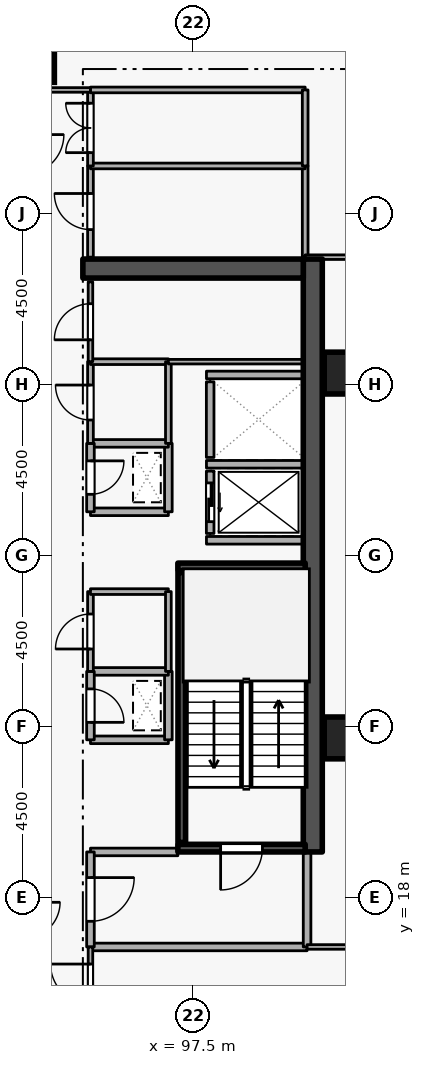
"""IFC4 building model, lengths in metres.
Left out: names, types, materials, properties, quantities, classifications, styles, units other than length and angle.
Written with IfcOpenShell. Run it as: python <this file> out.ifc"""

import sys

from ifc_helpers import new_model, si_unit, direction, frame, frame_2d, origin, origin_2d, place, context, subcontext, project, spatial, rectangle, extrude, element, fill, save


model = new_model("IFC4")
c1 = context("Model", 3, precision=1e-05, world=origin(), true_north=direction((0.0, 1.0)))
c2 = subcontext(c1, "Body", "Model", "MODEL_VIEW")
j1 = project(units=[si_unit("LENGTHUNIT", "METRE"), si_unit("PLANEANGLEUNIT", "RADIAN")], contexts=[c1])
p1 = place(None, origin())
s1 = spatial("IfcSite", under=j1, at=p1, CompositionType="ELEMENT")
p2 = place(p1, origin())
s2 = spatial("IfcBuilding", under=s1, at=p2, CompositionType="ELEMENT")
p3 = place(p2, frame((0.0, 0.0, 170.7)))
s3 = spatial("IfcBuildingStorey", under=s2, at=p3, CompositionType="ELEMENT", Elevation=170.7)
p4 = place(p3, frame((100.65, 19.2, 0.0), z_axis=(0.0, 0.0, 1.0), x_axis=(0.0, 1.0, 0.0)))
e1 = element("IfcWall", 1, at=p4, inside=s3, PredefinedType="SHEAR", context=c2, shape_type="SweptSolid", body=[
    extrude(rectangle(XDim=15.6, YDim=0.5, at=frame_2d((7.8, 0.0))), origin(), (0.0, 0.0, 1.0), 3.6),
])
p5 = place(p3, frame((94.6, 34.55, 0.0), z_axis=(0.0, 0.0, 1.0), x_axis=(1.0, 0.0, 0.0)))
e2 = element("IfcWall", 2, at=p5, inside=s3, PredefinedType="SHEAR", context=c2, shape_type="SweptSolid", body=[
    extrude(rectangle(XDim=5.8, YDim=0.5, at=frame_2d((2.9, 0.0))), origin(), (0.0, 0.0, 1.0), 3.6),
])
for number, where, z_axis, x_axis in (
    (3, (93.3, 40.0, 0.0), (0.0, 0.0, 1.0), (1.0, 0.0, 0.0)),
    (4, (101.5, 22.2, 0.0), (0.0, 0.0, 1.0), (1.0, 0.0, 0.0)),
    (5, (101.5, 31.8, 0.0), (0.0, 0.0, 1.0), (1.0, 0.0, 0.0)),
):
    element("IfcColumn", number, at=place(p3, frame(where, z_axis=z_axis, x_axis=x_axis)), inside=s3, PredefinedType="COLUMN", context=c2, shape_type="SweptSolid", body=[
        extrude(rectangle(XDim=1.1, YDim=1.1, at=origin_2d()), origin(), (0.0, 0.0, 1.0), 3.6),
    ])
p6 = place(p3, frame((97.95, 29.22, 0.0), z_axis=(0.0, 0.0, 1.0), x_axis=(0.0, -1.0, 0.0)))
e6 = element("IfcWall", 6, at=p6, inside=s3, PredefinedType="STANDARD", context=c2, shape_type="SweptSolid", body=[
    extrude(rectangle(XDim=1.64, YDim=0.2, at=frame_2d((0.82, 0.0))), origin(), (0.0, 0.0, 1.0), 3.26),
])
p7 = place(p6, frame((0.31, 0.0, 0.0)))
e7 = element("IfcOpeningElement", 7, at=p7, cuts=e6, PredefinedType="OPENING", context=c2, shape_type="SweptSolid", body=[
    extrude(rectangle(XDim=1.02, YDim=2.06, at=frame_2d((0.51, 1.03))), frame((0.0, 0.11, 0.0), z_axis=(0.0, -1.0, 0.0), x_axis=(1.0, 0.0, 0.0)), (0.0, 0.0, 1.0), 0.22),
])
p8 = place(p3, frame((97.95, 31.57, 0.0), z_axis=(0.0, 0.0, 1.0), x_axis=(0.0, -1.0, 0.0)))
e8 = element("IfcWall", 8, at=p8, inside=s3, PredefinedType="STANDARD", context=c2, shape_type="SweptSolid", body=[
    extrude(rectangle(XDim=1.99, YDim=0.2, at=frame_2d((0.995, 0.0))), origin(), (0.0, 0.0, 1.0), 3.26),
])
for number, where, z_axis, x_axis in (
    (9, (97.852, 29.4, 0.0), (0.0, 0.0, 1.0), (1.0, 0.0, 0.0)),
    (10, (97.852, 27.4, 0.0), (0.0, 0.0, 1.0), (1.0, 0.0, 0.0)),
    (11, (97.852, 31.75, 0.0), (0.0, 0.0, 1.0), (1.0, 0.0, 0.0)),
):
    element("IfcWall", number, at=place(p3, frame(where, z_axis=z_axis, x_axis=x_axis)), inside=s3, PredefinedType="STANDARD", context=c2, shape_type="SweptSolid", body=[
        extrude(rectangle(XDim=2.536, YDim=0.2, at=frame_2d((1.268, 0.0))), origin(), (0.0, 0.0, 1.0), 3.26),
    ])
p9 = place(p3, frame((100.45, 19.3, 0.0), z_axis=(0.0, 0.0, 1.0), x_axis=(-1.0, 0.0, 0.0)))
e12 = element("IfcWall", 12, at=p9, inside=s3, PredefinedType="SHEAR", context=c2, shape_type="SweptSolid", body=[
    extrude(rectangle(XDim=3.35, YDim=0.2, at=frame_2d((1.675, 0.0))), origin(), (0.0, 0.0, 1.0), 3.6),
])
p10 = place(p9, frame((1.125, 0.0, 0.0)))
e13 = element("IfcOpeningElement", 13, at=p10, cuts=e12, PredefinedType="OPENING", context=c2, shape_type="SweptSolid", body=[
    extrude(rectangle(XDim=1.1, YDim=2.1, at=frame_2d((0.55, 1.05))), frame((0.0, 0.11, 0.0), z_axis=(0.0, -1.0, 0.0), x_axis=(1.0, 0.0, 0.0)), (0.0, 0.0, 1.0), 0.22),
])
p11 = place(p3, frame((97.1, 26.7, 0.0), z_axis=(0.0, 0.0, 1.0), x_axis=(1.0, 0.0, 0.0)))
e14 = element("IfcWall", 14, at=p11, inside=s3, PredefinedType="SHEAR", context=c2, shape_type="SweptSolid", body=[
    extrude(rectangle(XDim=3.35, YDim=0.2, at=frame_2d((1.675, 0.0))), origin(), (0.0, 0.0, 1.0), 3.6),
])
p12 = place(p3, frame((97.203, 26.55, 0.0), z_axis=(0.0, 0.0, 1.0), x_axis=(0.0, -1.0, 0.0)))
e15 = element("IfcWall", 15, at=p12, inside=s3, PredefinedType="SHEAR", context=c2, shape_type="SweptSolid", body=[
    extrude(rectangle(XDim=7.1, YDim=0.2, at=frame_2d((3.55, 0.0))), origin(), (0.0, 0.0, 1.0), 3.6),
])
p13 = place(p3, frame((94.8, 16.7, 0.0), z_axis=(0.0, 0.0, 1.0), x_axis=(1.0, 0.0, 0.0)))
e16 = element("IfcWall", 16, at=p13, inside=s3, PredefinedType="STANDARD", context=c2, shape_type="SweptSolid", body=[
    extrude(rectangle(XDim=5.7, YDim=0.2, at=frame_2d((2.85, 0.0))), origin(), (0.0, 0.0, 1.0), 3.26),
])
p14 = place(p3, frame((100.5, 16.7, 0.0), z_axis=(0.0, 0.0, 1.0), x_axis=(0.0, 1.0, 0.0)))
e17 = element("IfcWall", 17, at=p14, inside=s3, PredefinedType="STANDARD", context=c2, shape_type="SweptSolid", body=[
    extrude(rectangle(XDim=2.5, YDim=0.2, at=frame_2d((1.25, 0.0))), origin(), (0.0, 0.0, 1.0), 3.26),
])
p15 = place(p3, frame((97.1, 19.2, 0.0), z_axis=(0.0, 0.0, 1.0), x_axis=(-1.0, 0.0, 0.0)))
e18 = element("IfcWall", 18, at=p15, inside=s3, PredefinedType="STANDARD", context=c2, shape_type="SweptSolid", body=[
    extrude(rectangle(XDim=2.3, YDim=0.2, at=frame_2d((1.15, 0.0))), origin(), (0.0, 0.0, 1.0), 2.465),
])
p16 = place(p3, frame((94.8, 19.2, 0.0), z_axis=(0.0, 0.0, 1.0), x_axis=(0.0, -1.0, 0.0)))
e19 = element("IfcWall", 19, at=p16, inside=s3, PredefinedType="STANDARD", context=c2, shape_type="SweptSolid", body=[
    extrude(rectangle(XDim=2.5, YDim=0.2, at=frame_2d((1.25, 0.0))), origin(), (0.0, 0.0, 1.0), 3.26),
])
p17 = place(p16, frame((0.675, 0.0, 0.0)))
e20 = element("IfcOpeningElement", 20, at=p17, cuts=e19, PredefinedType="OPENING", context=c2, shape_type="SweptSolid", body=[
    extrude(rectangle(XDim=1.15, YDim=2.1, at=frame_2d((0.575, 1.05))), frame((0.0, 0.11, 0.0), z_axis=(0.0, -1.0, 0.0), x_axis=(1.0, 0.0, 0.0)), (0.0, 0.0, 1.0), 0.22),
])
p18 = place(p3, frame((94.8, 28.15, 0.0), z_axis=(0.0, 0.0, 1.0), x_axis=(1.0, 0.0, 0.0)))
e21 = element("IfcWall", 21, at=p18, inside=s3, PredefinedType="STANDARD", context=c2, shape_type="SweptSolid", body=[
    extrude(rectangle(XDim=2.05, YDim=0.2, at=frame_2d((1.025, 0.0))), origin(), (0.0, 0.0, 1.0), 3.26),
])
p19 = place(p3, frame((96.85, 28.15, 0.0), z_axis=(0.0, 0.0, 1.0), x_axis=(0.0, 1.0, 0.0)))
e22 = element("IfcWall", 22, at=p19, inside=s3, PredefinedType="STANDARD", context=c2, shape_type="SweptSolid", body=[
    extrude(rectangle(XDim=1.8, YDim=0.2, at=frame_2d((0.9, 0.0))), origin(), (0.0, 0.0, 1.0), 3.26),
])
p20 = place(p3, frame((96.85, 29.95, 0.0), z_axis=(0.0, 0.0, 1.0), x_axis=(-1.0, 0.0, 0.0)))
e23 = element("IfcWall", 23, at=p20, inside=s3, PredefinedType="STANDARD", context=c2, shape_type="SweptSolid", body=[
    extrude(rectangle(XDim=2.05, YDim=0.2, at=frame_2d((1.025, 0.0))), origin(), (0.0, 0.0, 1.0), 3.26),
])
p21 = place(p3, frame((94.8, 29.95, 0.0), z_axis=(0.0, 0.0, 1.0), x_axis=(0.0, -1.0, 0.0)))
e24 = element("IfcWall", 24, at=p21, inside=s3, PredefinedType="STANDARD", context=c2, shape_type="SweptSolid", body=[
    extrude(rectangle(XDim=1.8, YDim=0.2, at=frame_2d((0.9, 0.0))), origin(), (0.0, 0.0, 1.0), 3.26),
])
p22 = place(p21, frame((0.46, 0.0, 0.0)))
e25 = element("IfcOpeningElement", 25, at=p22, cuts=e24, PredefinedType="OPENING", context=c2, shape_type="SweptSolid", body=[
    extrude(rectangle(XDim=0.88, YDim=2.04, at=frame_2d((0.44, 1.02))), frame((0.0, 0.11, 0.0), z_axis=(0.0, -1.0, 0.0), x_axis=(1.0, 0.0, 0.0)), (0.0, 0.0, 1.0), 0.22),
])
p23 = place(p3, frame((94.8, 22.15, 0.0), z_axis=(0.0, 0.0, 1.0), x_axis=(1.0, 0.0, 0.0)))
e26 = element("IfcWall", 26, at=p23, inside=s3, PredefinedType="STANDARD", context=c2, shape_type="SweptSolid", body=[
    extrude(rectangle(XDim=2.05, YDim=0.2, at=frame_2d((1.025, 0.0))), origin(), (0.0, 0.0, 1.0), 3.26),
])
p24 = place(p3, frame((96.85, 22.15, 0.0), z_axis=(0.0, 0.0, 1.0), x_axis=(0.0, 1.0, 0.0)))
e27 = element("IfcWall", 27, at=p24, inside=s3, PredefinedType="STANDARD", context=c2, shape_type="SweptSolid", body=[
    extrude(rectangle(XDim=1.8, YDim=0.2, at=frame_2d((0.9, 0.0))), origin(), (0.0, 0.0, 1.0), 3.26),
])
p25 = place(p3, frame((96.85, 23.95, 0.0), z_axis=(0.0, 0.0, 1.0), x_axis=(-1.0, 0.0, 0.0)))
e28 = element("IfcWall", 28, at=p25, inside=s3, PredefinedType="STANDARD", context=c2, shape_type="SweptSolid", body=[
    extrude(rectangle(XDim=2.05, YDim=0.2, at=frame_2d((1.025, 0.0))), origin(), (0.0, 0.0, 1.0), 3.26),
])
p26 = place(p3, frame((94.8, 23.95, 0.0), z_axis=(0.0, 0.0, 1.0), x_axis=(0.0, -1.0, 0.0)))
e29 = element("IfcWall", 29, at=p26, inside=s3, PredefinedType="STANDARD", context=c2, shape_type="SweptSolid", body=[
    extrude(rectangle(XDim=1.8, YDim=0.2, at=frame_2d((0.9, 0.0))), origin(), (0.0, 0.0, 1.0), 3.26),
])
p27 = place(p26, frame((0.46, 0.0, 0.0)))
e30 = element("IfcOpeningElement", 30, at=p27, cuts=e29, PredefinedType="OPENING", context=c2, shape_type="SweptSolid", body=[
    extrude(rectangle(XDim=0.88, YDim=2.04, at=frame_2d((0.44, 1.02))), frame((0.0, 0.11, 0.0), z_axis=(0.0, -1.0, 0.0), x_axis=(1.0, 0.0, 0.0)), (0.0, 0.0, 1.0), 0.22),
])
p28 = place(p3, frame((94.8, 23.95, 0.0), z_axis=(0.0, 0.0, 1.0), x_axis=(0.0, 1.0, 0.0)))
e31 = element("IfcWall", 31, at=p28, inside=s3, PredefinedType="PARTITIONING", context=c2, shape_type="SweptSolid", body=[
    extrude(rectangle(XDim=2.1, YDim=0.15, at=frame_2d((1.05, 0.0))), origin(), (0.0, 0.0, 1.0), 3.26),
])
p29 = place(p28, frame((0.59, 0.0, 0.0)))
e32 = element("IfcOpeningElement", 32, at=p29, cuts=e31, PredefinedType="OPENING", context=c2, shape_type="SweptSolid", body=[
    extrude(rectangle(XDim=0.92, YDim=2.08, at=frame_2d((0.46, 1.04))), frame((0.0, 0.085, 0.0), z_axis=(0.0, -1.0, 0.0), x_axis=(1.0, 0.0, 0.0)), (0.0, 0.0, 1.0), 0.17),
])
p30 = place(p3, frame((94.8, 26.05, 0.0), z_axis=(0.0, 0.0, 1.0), x_axis=(1.0, 0.0, 0.0)))
e33 = element("IfcWall", 33, at=p30, inside=s3, PredefinedType="PARTITIONING", context=c2, shape_type="SweptSolid", body=[
    extrude(rectangle(XDim=2.05, YDim=0.15, at=frame_2d((1.025, 0.0))), origin(), (0.0, 0.0, 1.0), 3.26),
])
p31 = place(p3, frame((96.85, 26.05, 0.0), z_axis=(0.0, 0.0, 1.0), x_axis=(0.0, -1.0, 0.0)))
e34 = element("IfcWall", 34, at=p31, inside=s3, PredefinedType="PARTITIONING", context=c2, shape_type="SweptSolid", body=[
    extrude(rectangle(XDim=2.1, YDim=0.15, at=frame_2d((1.05, 0.0))), origin(), (0.0, 0.0, 1.0), 3.26),
])
p32 = place(p3, frame((94.8, 29.95, 0.0), z_axis=(0.0, 0.0, 1.0), x_axis=(0.0, 1.0, 0.0)))
e35 = element("IfcWall", 35, at=p32, inside=s3, PredefinedType="PARTITIONING", context=c2, shape_type="SweptSolid", body=[
    extrude(rectangle(XDim=2.15, YDim=0.15, at=frame_2d((1.075, 0.0))), origin(), (0.0, 0.0, 1.0), 3.26),
])
p33 = place(p32, frame((0.615, 0.0, 0.0)))
e36 = element("IfcOpeningElement", 36, at=p33, cuts=e35, PredefinedType="OPENING", context=c2, shape_type="SweptSolid", body=[
    extrude(rectangle(XDim=0.92, YDim=2.08, at=frame_2d((0.46, 1.04))), frame((0.0, 0.085, 0.0), z_axis=(0.0, -1.0, 0.0), x_axis=(1.0, 0.0, 0.0)), (0.0, 0.0, 1.0), 0.17),
])
p34 = place(p3, frame((94.8, 32.1, 0.0), z_axis=(0.0, 0.0, 1.0), x_axis=(1.0, 0.0, 0.0)))
e37 = element("IfcWall", 37, at=p34, inside=s3, PredefinedType="PARTITIONING", context=c2, shape_type="SweptSolid", body=[
    extrude(rectangle(XDim=2.05, YDim=0.15, at=frame_2d((1.025, 0.0))), origin(), (0.0, 0.0, 1.0), 3.26),
])
p35 = place(p3, frame((96.85, 32.1, 0.0), z_axis=(0.0, 0.0, 1.0), x_axis=(0.0, -1.0, 0.0)))
e38 = element("IfcWall", 38, at=p35, inside=s3, PredefinedType="PARTITIONING", context=c2, shape_type="SweptSolid", body=[
    extrude(rectangle(XDim=2.15, YDim=0.15, at=frame_2d((1.075, 0.0))), origin(), (0.0, 0.0, 1.0), 3.26),
])
p36 = place(p3, frame((94.8, 32.1, 0.0), z_axis=(0.0, 0.0, 1.0), x_axis=(0.0, 1.0, 0.0)))
e39 = element("IfcWall", 39, at=p36, inside=s3, PredefinedType="PARTITIONING", context=c2, shape_type="SweptSolid", body=[
    extrude(rectangle(XDim=2.1, YDim=0.12, at=frame_2d((1.05, 0.0))), origin(), (0.0, 0.0, 1.0), 3.26),
])
p37 = place(p36, frame((0.575, 0.0, 0.0)))
e40 = element("IfcOpeningElement", 40, at=p37, cuts=e39, PredefinedType="OPENING", context=c2, shape_type="SweptSolid", body=[
    extrude(rectangle(XDim=0.95, YDim=2.1, at=frame_2d((0.475, 1.05))), frame((0.0, 0.07, 0.0), z_axis=(0.0, -1.0, 0.0), x_axis=(1.0, 0.0, 0.0)), (0.0, 0.0, 1.0), 0.14),
])
p38 = place(p3, frame((100.4, 32.1, 0.0), z_axis=(0.0, 0.0, 1.0), x_axis=(-1.0, 0.0, 0.0)))
e41 = element("IfcWall", 41, at=p38, inside=s3, PredefinedType="PARTITIONING", context=c2, shape_type="SweptSolid", body=[
    extrude(rectangle(XDim=3.55, YDim=0.12, at=frame_2d((1.775, 0.0))), origin(), (0.0, 0.0, 1.0), 3.26),
])
p39 = place(p3, frame((100.45, 37.25, 0.0), z_axis=(0.0, 0.0, 1.0), x_axis=(0.0, -1.0, 0.0)))
e42 = element("IfcWall", 42, at=p39, inside=s3, PredefinedType="PARTITIONING", context=c2, shape_type="SweptSolid", body=[
    extrude(rectangle(XDim=2.4, YDim=0.15, at=frame_2d((1.2, 0.0))), origin(), (0.0, 0.0, 1.0), 3.26),
])
p40 = place(p3, frame((94.8, 34.85, 0.0), z_axis=(0.0, 0.0, 1.0), x_axis=(0.0, 1.0, 0.0)))
e43 = element("IfcWall", 43, at=p40, inside=s3, PredefinedType="PARTITIONING", context=c2, shape_type="SweptSolid", body=[
    extrude(rectangle(XDim=2.4, YDim=0.15, at=frame_2d((1.2, 0.0))), origin(), (0.0, 0.0, 1.0), 3.26),
])
p41 = place(p40, frame((0.725, 0.0, 0.0)))
e44 = element("IfcOpeningElement", 44, at=p41, cuts=e43, PredefinedType="OPENING", context=c2, shape_type="SweptSolid", body=[
    extrude(rectangle(XDim=0.95, YDim=2.1, at=frame_2d((0.475, 1.05))), frame((0.0, 0.085, 0.0), z_axis=(0.0, -1.0, 0.0), x_axis=(1.0, 0.0, 0.0)), (0.0, 0.0, 1.0), 0.17),
])
p42 = place(p3, frame((94.8, 37.25, 0.0), z_axis=(0.0, 0.0, 1.0), x_axis=(1.0, 0.0, 0.0)))
e45 = element("IfcWall", 45, at=p42, inside=s3, PredefinedType="PARTITIONING", context=c2, shape_type="SweptSolid", body=[
    extrude(rectangle(XDim=5.65, YDim=0.15, at=frame_2d((2.825, 0.0))), origin(), (0.0, 0.0, 1.0), 3.26),
])
p43 = place(p3, frame((94.8, 37.25, 0.0), z_axis=(0.0, 0.0, 1.0), x_axis=(0.0, 1.0, 0.0)))
e46 = element("IfcWall", 46, at=p43, inside=s3, PredefinedType="PARTITIONING", context=c2, shape_type="SweptSolid", body=[
    extrude(rectangle(XDim=2.0, YDim=0.15, at=frame_2d((1.0, 0.0))), origin(), (0.0, 0.0, 1.0), 3.26),
])
p44 = place(p43, frame((0.35, 0.0, 0.0)))
e47 = element("IfcOpeningElement", 47, at=p44, cuts=e46, PredefinedType="OPENING", context=c2, shape_type="SweptSolid", body=[
    extrude(rectangle(XDim=1.3, YDim=2.12, at=frame_2d((0.65, 1.06))), frame((0.0, 0.085, 0.0), z_axis=(0.0, -1.0, 0.0), x_axis=(1.0, 0.0, 0.0)), (0.0, 0.0, 1.0), 0.17),
])
p45 = place(p3, frame((94.8, 39.25, 0.0), z_axis=(0.0, 0.0, 1.0), x_axis=(1.0, 0.0, 0.0)))
e48 = element("IfcWall", 48, at=p45, inside=s3, PredefinedType="PARTITIONING", context=c2, shape_type="SweptSolid", body=[
    extrude(rectangle(XDim=5.65, YDim=0.15, at=frame_2d((2.825, 0.0))), origin(), (0.0, 0.0, 1.0), 3.26),
])
p46 = place(p3, frame((100.45, 39.25, 0.0), z_axis=(0.0, 0.0, 1.0), x_axis=(0.0, -1.0, 0.0)))
e49 = element("IfcWall", 49, at=p46, inside=s3, PredefinedType="PARTITIONING", context=c2, shape_type="SweptSolid", body=[
    extrude(rectangle(XDim=2.0, YDim=0.15, at=frame_2d((1.0, 0.0))), origin(), (0.0, 0.0, 1.0), 3.26),
])
p47 = place(p3, frame((94.8, 14.75, 0.0), z_axis=(0.0, 0.0, 1.0), x_axis=(0.0, 1.0, 0.0)))
e50 = element("IfcWall", 50, at=p47, inside=s3, PredefinedType="PARTITIONING", context=c2, shape_type="SweptSolid", body=[
    extrude(rectangle(XDim=1.95, YDim=0.12, at=frame_2d((0.975, 0.0))), origin(), (0.0, 0.0, 1.0), 3.26),
])
p48 = place(p47, frame((0.45, 0.0, 0.0)))
e51 = element("IfcOpeningElement", 51, at=p48, cuts=e50, PredefinedType="OPENING", context=c2, shape_type="SweptSolid", body=[
    extrude(rectangle(XDim=1.05, YDim=2.1, at=frame_2d((0.525, 1.05))), frame((0.0, 0.07, 0.0), z_axis=(0.0, -1.0, 0.0), x_axis=(1.0, 0.0, 0.0)), (0.0, 0.0, 1.0), 0.14),
])
p49 = place(p3, frame((100.5, 16.7, 0.0), z_axis=(0.0, 0.0, 1.0), x_axis=(1.0, 0.0, 0.0)))
e52 = element("IfcWall", 52, at=p49, inside=s3, PredefinedType="PARTITIONING", context=c2, shape_type="SweptSolid", body=[
    extrude(rectangle(XDim=11.72, YDim=0.12, at=frame_2d((5.86, 0.0))), origin(), (0.0, 0.0, 1.0), 3.26),
])
p50 = place(p3, frame((94.8, 39.25, 0.0), z_axis=(0.0, 0.0, 1.0), x_axis=(-1.0, 0.0, 0.0)))
e53 = element("IfcWall", 53, at=p50, inside=s3, PredefinedType="PARTITIONING", context=c2, shape_type="SweptSolid", body=[
    extrude(rectangle(XDim=1.75, YDim=0.12, at=frame_2d((0.875, 0.0))), origin(), (0.0, 0.0, 1.0), 3.26),
])
p51 = place(p3, frame((112.22, 34.85, 0.0), z_axis=(0.0, 0.0, 1.0), x_axis=(-1.0, 0.0, 0.0)))
e54 = element("IfcWall", 54, at=p51, inside=s3, PredefinedType="PARTITIONING", context=c2, shape_type="SweptSolid", body=[
    extrude(rectangle(XDim=11.77, YDim=0.12, at=frame_2d((5.885, 0.0))), origin(), (0.0, 0.0, 1.0), 2.465),
])
p52 = place(p7, origin())
e55 = element("IfcDoor", 55, at=p52, inside=s3, OperationType="SLIDING_TO_LEFT", PredefinedType="DOOR", context=c2, shape_type="SweptSolid", body=[
    extrude(rectangle(XDim=1.02, YDim=2.06, at=frame_2d((0.51, 1.03))), frame((0.0, 0.025, 0.0), z_axis=(0.0, -1.0, 0.0), x_axis=(1.0, 0.0, 0.0)), (0.0, 0.0, 1.0), 0.05),
])
fill(e7, e55)
p53 = place(p10, origin())
e56 = element("IfcDoor", 56, at=p53, inside=s3, OperationType="SINGLE_SWING_RIGHT", PredefinedType="DOOR", context=c2, shape_type="SweptSolid", body=[
    extrude(rectangle(XDim=1.1, YDim=2.1, at=frame_2d((0.55, 1.05))), frame((0.0, 0.025, 0.0), z_axis=(0.0, -1.0, 0.0), x_axis=(1.0, 0.0, 0.0)), (0.0, 0.0, 1.0), 0.05),
])
fill(e13, e56)
p54 = place(p17, origin())
e57 = element("IfcDoor", 57, at=p54, inside=s3, OperationType="SINGLE_SWING_LEFT", PredefinedType="DOOR", context=c2, shape_type="SweptSolid", body=[
    extrude(rectangle(XDim=1.15, YDim=2.1, at=frame_2d((0.575, 1.05))), frame((0.0, 0.025, 0.0), z_axis=(0.0, -1.0, 0.0), x_axis=(1.0, 0.0, 0.0)), (0.0, 0.0, 1.0), 0.05),
])
fill(e20, e57)
p55 = place(p22, origin())
e58 = element("IfcDoor", 58, at=p55, inside=s3, OperationType="SINGLE_SWING_LEFT", PredefinedType="DOOR", context=c2, shape_type="SweptSolid", body=[
    extrude(rectangle(XDim=0.88, YDim=2.04, at=frame_2d((0.44, 1.02))), frame((0.0, 0.025, 0.0), z_axis=(0.0, -1.0, 0.0), x_axis=(1.0, 0.0, 0.0)), (0.0, 0.0, 1.0), 0.05),
])
fill(e25, e58)
p56 = place(p27, origin())
e59 = element("IfcDoor", 59, at=p56, inside=s3, OperationType="SINGLE_SWING_RIGHT", PredefinedType="DOOR", context=c2, shape_type="SweptSolid", body=[
    extrude(rectangle(XDim=0.88, YDim=2.04, at=frame_2d((0.44, 1.02))), frame((0.0, 0.025, 0.0), z_axis=(0.0, -1.0, 0.0), x_axis=(1.0, 0.0, 0.0)), (0.0, 0.0, 1.0), 0.05),
])
fill(e30, e59)
p57 = place(p29, origin())
e60 = element("IfcDoor", 60, at=p57, inside=s3, OperationType="SINGLE_SWING_LEFT", PredefinedType="DOOR", context=c2, shape_type="SweptSolid", body=[
    extrude(rectangle(XDim=0.92, YDim=2.08, at=frame_2d((0.46, 1.04))), frame((0.0, 0.025, 0.0), z_axis=(0.0, -1.0, 0.0), x_axis=(1.0, 0.0, 0.0)), (0.0, 0.0, 1.0), 0.05),
])
fill(e32, e60)
p58 = place(p33, origin())
e61 = element("IfcDoor", 61, at=p58, inside=s3, OperationType="SINGLE_SWING_RIGHT", PredefinedType="DOOR", context=c2, shape_type="SweptSolid", body=[
    extrude(rectangle(XDim=0.92, YDim=2.08, at=frame_2d((0.46, 1.04))), frame((0.0, 0.025, 0.0), z_axis=(0.0, -1.0, 0.0), x_axis=(1.0, 0.0, 0.0)), (0.0, 0.0, 1.0), 0.05),
])
fill(e36, e61)
p59 = place(p37, origin())
e62 = element("IfcDoor", 62, at=p59, inside=s3, OperationType="SINGLE_SWING_LEFT", PredefinedType="DOOR", context=c2, shape_type="SweptSolid", body=[
    extrude(rectangle(XDim=0.95, YDim=2.1, at=frame_2d((0.475, 1.05))), frame((0.0, 0.025, 0.0), z_axis=(0.0, -1.0, 0.0), x_axis=(1.0, 0.0, 0.0)), (0.0, 0.0, 1.0), 0.05),
])
fill(e40, e62)
p60 = place(p41, origin())
e63 = element("IfcDoor", 63, at=p60, inside=s3, OperationType="SINGLE_SWING_RIGHT", PredefinedType="DOOR", context=c2, shape_type="SweptSolid", body=[
    extrude(rectangle(XDim=0.95, YDim=2.1, at=frame_2d((0.475, 1.05))), frame((0.0, 0.025, 0.0), z_axis=(0.0, -1.0, 0.0), x_axis=(1.0, 0.0, 0.0)), (0.0, 0.0, 1.0), 0.05),
])
fill(e44, e63)
p61 = place(p44, origin())
e64 = element("IfcDoor", 64, at=p61, inside=s3, OperationType="DOUBLE_DOOR_SINGLE_SWING", PredefinedType="DOOR", context=c2, shape_type="SweptSolid", body=[
    extrude(rectangle(XDim=1.3, YDim=2.12, at=frame_2d((0.65, 1.06))), frame((0.0, 0.025, 0.0), z_axis=(0.0, -1.0, 0.0), x_axis=(1.0, 0.0, 0.0)), (0.0, 0.0, 1.0), 0.05),
])
fill(e47, e64)
p62 = place(p48, origin())
e65 = element("IfcDoor", 65, at=p62, inside=s3, OperationType="SINGLE_SWING_RIGHT", PredefinedType="DOOR", context=c2, shape_type="SweptSolid", body=[
    extrude(rectangle(XDim=1.05, YDim=2.1, at=frame_2d((0.525, 1.05))), frame((0.0, 0.025, 0.0), z_axis=(0.0, -1.0, 0.0), x_axis=(1.0, 0.0, 0.0)), (0.0, 0.0, 1.0), 0.05),
])
fill(e51, e65)
save(model, sys.argv[1])
